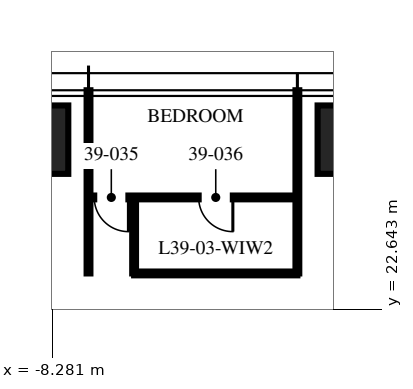
"""IFC4 building model, lengths in metres.
Left out: names, types, materials, properties, quantities, classifications, styles, units other than length and angle.
Written with IfcOpenShell. Run it as: python <this file> out.ifc"""

import sys

from ifc_helpers import new_model, si_unit, direction, frame, frame_2d, origin, origin_2d, place, context, subcontext, project, spatial, rectangle, extrude, element, fill, save


model = new_model("IFC4")
c1 = context("Model", 3, precision=1e-05, world=origin(), true_north=direction((0.0, 1.0)))
c2 = subcontext(c1, "Body", "Model", "MODEL_VIEW")
j1 = project(units=[si_unit("LENGTHUNIT", "METRE"), si_unit("PLANEANGLEUNIT", "RADIAN")], contexts=[c1])
p1 = place(None, origin())
s1 = spatial("IfcSite", under=j1, at=p1, CompositionType="ELEMENT")
p2 = place(p1, origin())
s2 = spatial("IfcBuilding", under=s1, at=p2, CompositionType="ELEMENT")
p3 = place(p2, frame((0.0, 0.0, 156.0)))
s3 = spatial("IfcBuildingStorey", under=s2, at=p3, CompositionType="ELEMENT", Elevation=156.0)
for number, where, z_axis, x_axis in (
    (1, (-9.16, 27.1, 0.0), (0.0, 0.0, 1.0), (1.0, 0.0, 0.0)),
    (2, (0.0, 27.1, 0.0), (0.0, 0.0, 1.0), (1.0, 0.0, 0.0)),
):
    element("IfcColumn", number, at=place(p3, frame(where, z_axis=z_axis, x_axis=x_axis)), inside=s3, PredefinedType="COLUMN", context=c2, shape_type="SweptSolid", body=[
        extrude(rectangle(XDim=2.6, YDim=1.8, at=origin_2d()), origin(), (0.0, 0.0, 1.0), 3.75),
    ])
for number, where, z_axis, x_axis in (
    (3, (-1.832, 23.58, 0.0), (0.0, 0.0, 1.0), (0.0, 1.0, 0.0)),
    (4, (-7.328, 23.58, 0.0), (0.0, 0.0, 1.0), (0.0, 1.0, 0.0)),
):
    element("IfcWall", number, at=place(p3, frame(where, z_axis=z_axis, x_axis=x_axis)), inside=s3, PredefinedType="PARTITIONING", context=c2, shape_type="SweptSolid", body=[
        extrude(rectangle(XDim=4.82, YDim=0.1, at=frame_2d((2.41, 0.0))), origin(), (0.0, 0.0, 1.0), 2.81),
    ])
p4 = place(p3, frame((-1.832, 25.58, 0.0), z_axis=(0.0, 0.0, 1.0), x_axis=(-1.0, 0.0, 0.0)))
e5 = element("IfcWall", 5, at=p4, inside=s3, PredefinedType="PARTITIONING", context=c2, shape_type="SweptSolid", body=[
    extrude(rectangle(XDim=5.496, YDim=0.1, at=frame_2d((2.748, 0.0))), origin(), (0.0, 0.0, 1.0), 2.81),
])
p5 = place(p4, frame((4.446, 0.0, 0.0)))
e6 = element("IfcOpeningElement", 6, at=p5, cuts=e5, PredefinedType="OPENING", context=c2, shape_type="SweptSolid", body=[
    extrude(rectangle(XDim=0.9, YDim=2.1, at=frame_2d((0.45, 1.05))), frame((0.0, 0.06, 0.0), z_axis=(0.0, -1.0, 0.0), x_axis=(1.0, 0.0, 0.0)), (0.0, 0.0, 1.0), 0.12),
])
p6 = place(p4, frame((1.698, 0.0, 0.0)))
e7 = element("IfcOpeningElement", 7, at=p6, cuts=e5, PredefinedType="OPENING", context=c2, shape_type="SweptSolid", body=[
    extrude(rectangle(XDim=0.9, YDim=2.1, at=frame_2d((0.45, 1.05))), frame((0.0, 0.06, 0.0), z_axis=(0.0, -1.0, 0.0), x_axis=(1.0, 0.0, 0.0)), (0.0, 0.0, 1.0), 0.12),
])
p7 = place(p3, frame((-6.128, 23.58, 0.0), z_axis=(0.0, 0.0, 1.0), x_axis=(0.0, 1.0, 0.0)))
e8 = element("IfcWall", 8, at=p7, inside=s3, PredefinedType="PARTITIONING", context=c2, shape_type="SweptSolid", body=[
    extrude(rectangle(XDim=2.0, YDim=0.1, at=frame_2d((1.0, 0.0))), origin(), (0.0, 0.0, 1.0), 3.5),
])
p8 = place(p3, frame((-1.832, 23.58, 0.0), z_axis=(0.0, 0.0, 1.0), x_axis=(-1.0, 0.0, 0.0)))
e9 = element("IfcWall", 9, at=p8, inside=s3, PredefinedType="PARTITIONING", context=c2, shape_type="SweptSolid", body=[
    extrude(rectangle(XDim=4.296, YDim=0.1, at=frame_2d((2.148, 0.0))), origin(), (0.0, 0.0, 1.0), 2.81),
])
p9 = place(p5, origin())
e10 = element("IfcDoor", 10, at=p9, inside=s3, OperationType="SINGLE_SWING_LEFT", PredefinedType="DOOR", context=c2, shape_type="SweptSolid", body=[
    extrude(rectangle(XDim=0.9, YDim=2.1, at=frame_2d((0.45, 1.05))), frame((0.0, 0.025, 0.0), z_axis=(0.0, -1.0, 0.0), x_axis=(1.0, 0.0, 0.0)), (0.0, 0.0, 1.0), 0.05),
])
fill(e6, e10)
p10 = place(p6, origin())
e11 = element("IfcDoor", 11, at=p10, inside=s3, OperationType="SINGLE_SWING_LEFT", PredefinedType="DOOR", context=c2, shape_type="SweptSolid", body=[
    extrude(rectangle(XDim=0.9, YDim=2.1, at=frame_2d((0.45, 1.05))), frame((0.0, 0.025, 0.0), z_axis=(0.0, -1.0, 0.0), x_axis=(1.0, 0.0, 0.0)), (0.0, 0.0, 1.0), 0.05),
])
fill(e7, e11)
save(model, sys.argv[1])
